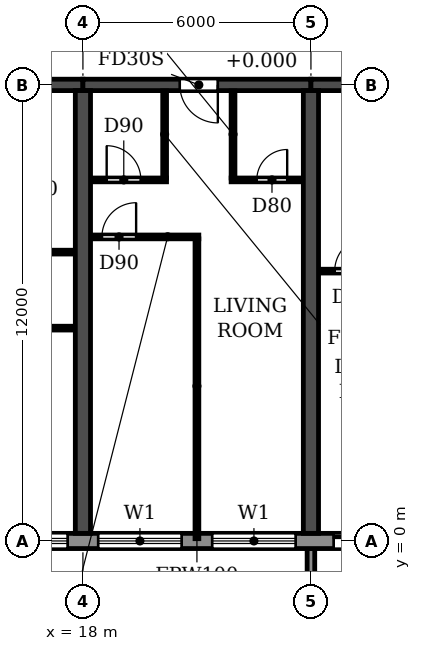
"""IFC4 building model, lengths in metres.
Left out: names, types, materials, properties, quantities, classifications, styles, units other than length and angle.
Written with IfcOpenShell. Run it as: python <this file> out.ifc"""

import sys

from ifc_helpers import new_model, si_unit, direction, frame, frame_2d, origin, place, context, subcontext, project, spatial, polyline, rectangle, outline, extrude, source, transform, mapped, element, fill, save


model = new_model("IFC4")
c1 = context("Model", 3, precision=1e-05, world=origin(), true_north=direction((0.0, 1.0)))
c2 = subcontext(c1, "Body", "Model", "MODEL_VIEW")
j1 = project(units=[si_unit("LENGTHUNIT", "METRE"), si_unit("PLANEANGLEUNIT", "RADIAN")], contexts=[c1])
p1 = place(None, origin())
s1 = spatial("IfcSite", under=j1, at=p1, CompositionType="ELEMENT")
p2 = place(p1, origin())
s2 = spatial("IfcBuilding", under=s1, at=p2, CompositionType="ELEMENT")
p3 = place(p2, frame((0.0, 0.0, 23.4)))
s3 = spatial("IfcBuildingStorey", under=s2, at=p3, CompositionType="ELEMENT", Elevation=23.4)
for number, where, z_axis, x_axis in (
    (1, (18.0, 0.2, 0.0), (0.0, 0.0, 1.0), (0.0, 1.0, 0.0)),
    (2, (24.0, 0.2, 0.0), (0.0, 0.0, 1.0), (0.0, 1.0, 0.0)),
):
    element("IfcWall", number, at=place(p3, frame(where, z_axis=z_axis, x_axis=x_axis)), inside=s3, PredefinedType="SHEAR", context=c2, shape_type="SweptSolid", body=[
        extrude(rectangle(XDim=11.65, YDim=0.4, at=frame_2d((5.825, 0.0))), origin(), (0.0, 0.0, 1.0), 3.05),
    ])
p4 = place(p3, frame((12.0, 12.0, 0.0), z_axis=(0.0, 0.0, 1.0), x_axis=(1.0, 0.0, 0.0)))
e3 = element("IfcWall", 3, at=p4, inside=s3, PredefinedType="SHEAR", context=c2, shape_type="SweptSolid", body=[
    extrude(rectangle(XDim=6.0, YDim=0.3, at=frame_2d((3.0, 0.0))), origin(), (0.0, 0.0, 1.0), 2.45),
])
p5 = place(p3, frame((18.0, 12.0, 0.0), z_axis=(0.0, 0.0, 1.0), x_axis=(1.0, 0.0, 0.0)))
e4 = element("IfcWall", 4, at=p5, inside=s3, PredefinedType="SHEAR", context=c2, shape_type="SweptSolid", body=[
    extrude(rectangle(XDim=6.0, YDim=0.3, at=frame_2d((3.0, 0.0))), origin(), (0.0, 0.0, 1.0), 2.45),
])
p6 = place(p5, frame((2.55, 0.0, 0.0)))
e5 = element("IfcOpeningElement", 5, at=p6, cuts=e4, PredefinedType="OPENING", context=c2, shape_type="SweptSolid", body=[
    extrude(rectangle(XDim=1.0, YDim=2.1, at=frame_2d((0.5, 1.05))), frame((0.0, 0.16, 0.0), z_axis=(0.0, -1.0, 0.0), x_axis=(1.0, 0.0, 0.0)), (0.0, 0.0, 1.0), 0.32),
])
p7 = place(p3, frame((24.0, 12.0, 0.0), z_axis=(0.0, 0.0, 1.0), x_axis=(1.0, 0.0, 0.0)))
e6 = element("IfcWall", 6, at=p7, inside=s3, PredefinedType="SHEAR", context=c2, shape_type="SweptSolid", body=[
    extrude(rectangle(XDim=6.0, YDim=0.3, at=frame_2d((3.0, 0.0))), origin(), (0.0, 0.0, 1.0), 2.45),
])
p8 = place(p7, frame((2.55, 0.0, 0.0)))
e7 = element("IfcOpeningElement", 7, at=p8, cuts=e6, PredefinedType="OPENING", context=c2, shape_type="SweptSolid", body=[
    extrude(rectangle(XDim=1.0, YDim=2.1, at=frame_2d((0.5, 1.05))), frame((0.0, 0.16, 0.0), z_axis=(0.0, -1.0, 0.0), x_axis=(1.0, 0.0, 0.0)), (0.0, 0.0, 1.0), 0.32),
])
p9 = place(p3, frame((4.683, 0.0, 0.0), z_axis=(0.0, 0.0, 1.0), x_axis=(1.0, 0.0, 0.0)))
e8 = element("IfcWall", 8, at=p9, inside=s3, PredefinedType="STANDARD", context=c2, shape_type="SweptSolid", body=[
    extrude(rectangle(XDim=92.634, YDim=0.4, at=frame_2d((46.317, 0.0))), origin(), (0.0, 0.0, 1.0), 3.05),
])
p10 = place(p9, frame((1.717, 0.0, 0.9)))
e9 = element("IfcOpeningElement", 9, at=p10, cuts=e8, PredefinedType="OPENING", context=c2, shape_type="SweptSolid", body=[
    extrude(rectangle(XDim=2.2, YDim=1.5, at=frame_2d((1.1, 0.75))), frame((0.0, 0.21, 0.0), z_axis=(0.0, -1.0, 0.0), x_axis=(1.0, 0.0, 0.0)), (0.0, 0.0, 1.0), 0.42),
])
p11 = place(p9, frame((4.717, 0.0, 0.9)))
e10 = element("IfcOpeningElement", 10, at=p11, cuts=e8, PredefinedType="OPENING", context=c2, shape_type="SweptSolid", body=[
    extrude(rectangle(XDim=2.2, YDim=1.5, at=frame_2d((1.1, 0.75))), frame((0.0, 0.21, 0.0), z_axis=(0.0, -1.0, 0.0), x_axis=(1.0, 0.0, 0.0)), (0.0, 0.0, 1.0), 0.42),
])
p12 = place(p9, frame((7.717, 0.0, 0.9)))
e11 = element("IfcOpeningElement", 11, at=p12, cuts=e8, PredefinedType="OPENING", context=c2, shape_type="SweptSolid", body=[
    extrude(rectangle(XDim=2.2, YDim=1.5, at=frame_2d((1.1, 0.75))), frame((0.0, 0.21, 0.0), z_axis=(0.0, -1.0, 0.0), x_axis=(1.0, 0.0, 0.0)), (0.0, 0.0, 1.0), 0.42),
])
p13 = place(p9, frame((10.717, 0.0, 0.9)))
e12 = element("IfcOpeningElement", 12, at=p13, cuts=e8, PredefinedType="OPENING", context=c2, shape_type="SweptSolid", body=[
    extrude(rectangle(XDim=2.2, YDim=1.5, at=frame_2d((1.1, 0.75))), frame((0.0, 0.21, 0.0), z_axis=(0.0, -1.0, 0.0), x_axis=(1.0, 0.0, 0.0)), (0.0, 0.0, 1.0), 0.42),
])
p14 = place(p9, frame((13.717, 0.0, 0.9)))
e13 = element("IfcOpeningElement", 13, at=p14, cuts=e8, PredefinedType="OPENING", context=c2, shape_type="SweptSolid", body=[
    extrude(rectangle(XDim=2.2, YDim=1.5, at=frame_2d((1.1, 0.75))), frame((0.0, 0.21, 0.0), z_axis=(0.0, -1.0, 0.0), x_axis=(1.0, 0.0, 0.0)), (0.0, 0.0, 1.0), 0.42),
])
p15 = place(p9, frame((16.717, 0.0, 0.9)))
e14 = element("IfcOpeningElement", 14, at=p15, cuts=e8, PredefinedType="OPENING", context=c2, shape_type="SweptSolid", body=[
    extrude(rectangle(XDim=2.2, YDim=1.5, at=frame_2d((1.1, 0.75))), frame((0.0, 0.21, 0.0), z_axis=(0.0, -1.0, 0.0), x_axis=(1.0, 0.0, 0.0)), (0.0, 0.0, 1.0), 0.42),
])
p16 = place(p9, frame((19.917, 0.0, 0.0)))
e15 = element("IfcOpeningElement", 15, at=p16, cuts=e8, PredefinedType="OPENING", context=c2, shape_type="SweptSolid", body=[
    extrude(rectangle(XDim=1.8, YDim=2.4, at=frame_2d((0.9, 1.2))), frame((0.0, 0.21, 0.0), z_axis=(0.0, -1.0, 0.0), x_axis=(1.0, 0.0, 0.0)), (0.0, 0.0, 1.0), 0.42),
])
p17 = place(p9, frame((22.717, 0.0, 0.9)))
e16 = element("IfcOpeningElement", 16, at=p17, cuts=e8, PredefinedType="OPENING", context=c2, shape_type="SweptSolid", body=[
    extrude(rectangle(XDim=2.2, YDim=1.5, at=frame_2d((1.1, 0.75))), frame((0.0, 0.21, 0.0), z_axis=(0.0, -1.0, 0.0), x_axis=(1.0, 0.0, 0.0)), (0.0, 0.0, 1.0), 0.42),
])
p18 = place(p9, frame((25.717, 0.0, 0.9)))
e17 = element("IfcOpeningElement", 17, at=p18, cuts=e8, PredefinedType="OPENING", context=c2, shape_type="SweptSolid", body=[
    extrude(rectangle(XDim=2.2, YDim=1.5, at=frame_2d((1.1, 0.75))), frame((0.0, 0.21, 0.0), z_axis=(0.0, -1.0, 0.0), x_axis=(1.0, 0.0, 0.0)), (0.0, 0.0, 1.0), 0.42),
])
p19 = place(p9, frame((28.717, 0.0, 0.9)))
e18 = element("IfcOpeningElement", 18, at=p19, cuts=e8, PredefinedType="OPENING", context=c2, shape_type="SweptSolid", body=[
    extrude(rectangle(XDim=2.2, YDim=1.5, at=frame_2d((1.1, 0.75))), frame((0.0, 0.21, 0.0), z_axis=(0.0, -1.0, 0.0), x_axis=(1.0, 0.0, 0.0)), (0.0, 0.0, 1.0), 0.42),
])
p20 = place(p9, frame((31.917, 0.0, 0.0)))
e19 = element("IfcOpeningElement", 19, at=p20, cuts=e8, PredefinedType="OPENING", context=c2, shape_type="SweptSolid", body=[
    extrude(rectangle(XDim=1.8, YDim=2.4, at=frame_2d((0.9, 1.2))), frame((0.0, 0.21, 0.0), z_axis=(0.0, -1.0, 0.0), x_axis=(1.0, 0.0, 0.0)), (0.0, 0.0, 1.0), 0.42),
])
p21 = place(p9, frame((34.717, 0.0, 0.9)))
e20 = element("IfcOpeningElement", 20, at=p21, cuts=e8, PredefinedType="OPENING", context=c2, shape_type="SweptSolid", body=[
    extrude(rectangle(XDim=2.2, YDim=1.5, at=frame_2d((1.1, 0.75))), frame((0.0, 0.21, 0.0), z_axis=(0.0, -1.0, 0.0), x_axis=(1.0, 0.0, 0.0)), (0.0, 0.0, 1.0), 0.42),
])
p22 = place(p9, frame((37.717, 0.0, 0.9)))
e21 = element("IfcOpeningElement", 21, at=p22, cuts=e8, PredefinedType="OPENING", context=c2, shape_type="SweptSolid", body=[
    extrude(rectangle(XDim=2.2, YDim=1.5, at=frame_2d((1.1, 0.75))), frame((0.0, 0.21, 0.0), z_axis=(0.0, -1.0, 0.0), x_axis=(1.0, 0.0, 0.0)), (0.0, 0.0, 1.0), 0.42),
])
p23 = place(p9, frame((40.717, 0.0, 0.9)))
e22 = element("IfcOpeningElement", 22, at=p23, cuts=e8, PredefinedType="OPENING", context=c2, shape_type="SweptSolid", body=[
    extrude(rectangle(XDim=2.2, YDim=1.5, at=frame_2d((1.1, 0.75))), frame((0.0, 0.21, 0.0), z_axis=(0.0, -1.0, 0.0), x_axis=(1.0, 0.0, 0.0)), (0.0, 0.0, 1.0), 0.42),
])
p24 = place(p9, frame((43.917, 0.0, 0.0)))
e23 = element("IfcOpeningElement", 23, at=p24, cuts=e8, PredefinedType="OPENING", context=c2, shape_type="SweptSolid", body=[
    extrude(rectangle(XDim=1.8, YDim=2.4, at=frame_2d((0.9, 1.2))), frame((0.0, 0.21, 0.0), z_axis=(0.0, -1.0, 0.0), x_axis=(1.0, 0.0, 0.0)), (0.0, 0.0, 1.0), 0.42),
])
p25 = place(p9, frame((46.717, 0.0, 0.9)))
e24 = element("IfcOpeningElement", 24, at=p25, cuts=e8, PredefinedType="OPENING", context=c2, shape_type="SweptSolid", body=[
    extrude(rectangle(XDim=2.2, YDim=1.5, at=frame_2d((1.1, 0.75))), frame((0.0, 0.21, 0.0), z_axis=(0.0, -1.0, 0.0), x_axis=(1.0, 0.0, 0.0)), (0.0, 0.0, 1.0), 0.42),
])
p26 = place(p9, frame((49.717, 0.0, 0.9)))
e25 = element("IfcOpeningElement", 25, at=p26, cuts=e8, PredefinedType="OPENING", context=c2, shape_type="SweptSolid", body=[
    extrude(rectangle(XDim=2.2, YDim=1.5, at=frame_2d((1.1, 0.75))), frame((0.0, 0.21, 0.0), z_axis=(0.0, -1.0, 0.0), x_axis=(1.0, 0.0, 0.0)), (0.0, 0.0, 1.0), 0.42),
])
p27 = place(p9, frame((52.717, 0.0, 0.9)))
e26 = element("IfcOpeningElement", 26, at=p27, cuts=e8, PredefinedType="OPENING", context=c2, shape_type="SweptSolid", body=[
    extrude(rectangle(XDim=2.2, YDim=1.5, at=frame_2d((1.1, 0.75))), frame((0.0, 0.21, 0.0), z_axis=(0.0, -1.0, 0.0), x_axis=(1.0, 0.0, 0.0)), (0.0, 0.0, 1.0), 0.42),
])
p28 = place(p9, frame((55.717, 0.0, 0.9)))
e27 = element("IfcOpeningElement", 27, at=p28, cuts=e8, PredefinedType="OPENING", context=c2, shape_type="SweptSolid", body=[
    extrude(rectangle(XDim=2.2, YDim=1.5, at=frame_2d((1.1, 0.75))), frame((0.0, 0.21, 0.0), z_axis=(0.0, -1.0, 0.0), x_axis=(1.0, 0.0, 0.0)), (0.0, 0.0, 1.0), 0.42),
])
p29 = place(p9, frame((58.917, 0.0, 0.0)))
e28 = element("IfcOpeningElement", 28, at=p29, cuts=e8, PredefinedType="OPENING", context=c2, shape_type="SweptSolid", body=[
    extrude(rectangle(XDim=1.8, YDim=2.4, at=frame_2d((0.9, 1.2))), frame((0.0, 0.21, 0.0), z_axis=(0.0, -1.0, 0.0), x_axis=(1.0, 0.0, 0.0)), (0.0, 0.0, 1.0), 0.42),
])
p30 = place(p9, frame((61.717, 0.0, 0.9)))
e29 = element("IfcOpeningElement", 29, at=p30, cuts=e8, PredefinedType="OPENING", context=c2, shape_type="SweptSolid", body=[
    extrude(rectangle(XDim=2.2, YDim=1.5, at=frame_2d((1.1, 0.75))), frame((0.0, 0.21, 0.0), z_axis=(0.0, -1.0, 0.0), x_axis=(1.0, 0.0, 0.0)), (0.0, 0.0, 1.0), 0.42),
])
p31 = place(p9, frame((64.717, 0.0, 0.9)))
e30 = element("IfcOpeningElement", 30, at=p31, cuts=e8, PredefinedType="OPENING", context=c2, shape_type="SweptSolid", body=[
    extrude(rectangle(XDim=2.2, YDim=1.5, at=frame_2d((1.1, 0.75))), frame((0.0, 0.21, 0.0), z_axis=(0.0, -1.0, 0.0), x_axis=(1.0, 0.0, 0.0)), (0.0, 0.0, 1.0), 0.42),
])
p32 = place(p9, frame((67.717, 0.0, 0.9)))
e31 = element("IfcOpeningElement", 31, at=p32, cuts=e8, PredefinedType="OPENING", context=c2, shape_type="SweptSolid", body=[
    extrude(rectangle(XDim=2.2, YDim=1.5, at=frame_2d((1.1, 0.75))), frame((0.0, 0.21, 0.0), z_axis=(0.0, -1.0, 0.0), x_axis=(1.0, 0.0, 0.0)), (0.0, 0.0, 1.0), 0.42),
])
p33 = place(p9, frame((70.917, 0.0, 0.0)))
e32 = element("IfcOpeningElement", 32, at=p33, cuts=e8, PredefinedType="OPENING", context=c2, shape_type="SweptSolid", body=[
    extrude(rectangle(XDim=1.8, YDim=2.4, at=frame_2d((0.9, 1.2))), frame((0.0, 0.21, 0.0), z_axis=(0.0, -1.0, 0.0), x_axis=(1.0, 0.0, 0.0)), (0.0, 0.0, 1.0), 0.42),
])
p34 = place(p9, frame((73.717, 0.0, 0.9)))
e33 = element("IfcOpeningElement", 33, at=p34, cuts=e8, PredefinedType="OPENING", context=c2, shape_type="SweptSolid", body=[
    extrude(rectangle(XDim=2.2, YDim=1.5, at=frame_2d((1.1, 0.75))), frame((0.0, 0.21, 0.0), z_axis=(0.0, -1.0, 0.0), x_axis=(1.0, 0.0, 0.0)), (0.0, 0.0, 1.0), 0.42),
])
p35 = place(p9, frame((76.717, 0.0, 0.9)))
e34 = element("IfcOpeningElement", 34, at=p35, cuts=e8, PredefinedType="OPENING", context=c2, shape_type="SweptSolid", body=[
    extrude(rectangle(XDim=2.2, YDim=1.5, at=frame_2d((1.1, 0.75))), frame((0.0, 0.21, 0.0), z_axis=(0.0, -1.0, 0.0), x_axis=(1.0, 0.0, 0.0)), (0.0, 0.0, 1.0), 0.42),
])
p36 = place(p9, frame((79.717, 0.0, 0.9)))
e35 = element("IfcOpeningElement", 35, at=p36, cuts=e8, PredefinedType="OPENING", context=c2, shape_type="SweptSolid", body=[
    extrude(rectangle(XDim=2.2, YDim=1.5, at=frame_2d((1.1, 0.75))), frame((0.0, 0.21, 0.0), z_axis=(0.0, -1.0, 0.0), x_axis=(1.0, 0.0, 0.0)), (0.0, 0.0, 1.0), 0.42),
])
p37 = place(p9, frame((82.717, 0.0, 0.9)))
e36 = element("IfcOpeningElement", 36, at=p37, cuts=e8, PredefinedType="OPENING", context=c2, shape_type="SweptSolid", body=[
    extrude(rectangle(XDim=2.2, YDim=1.5, at=frame_2d((1.1, 0.75))), frame((0.0, 0.21, 0.0), z_axis=(0.0, -1.0, 0.0), x_axis=(1.0, 0.0, 0.0)), (0.0, 0.0, 1.0), 0.42),
])
p38 = place(p9, frame((85.717, 0.0, 0.9)))
e37 = element("IfcOpeningElement", 37, at=p38, cuts=e8, PredefinedType="OPENING", context=c2, shape_type="SweptSolid", body=[
    extrude(rectangle(XDim=2.2, YDim=1.5, at=frame_2d((1.1, 0.75))), frame((0.0, 0.21, 0.0), z_axis=(0.0, -1.0, 0.0), x_axis=(1.0, 0.0, 0.0)), (0.0, 0.0, 1.0), 0.42),
])
p39 = place(p9, frame((88.717, 0.0, 0.9)))
e38 = element("IfcOpeningElement", 38, at=p39, cuts=e8, PredefinedType="OPENING", context=c2, shape_type="SweptSolid", body=[
    extrude(rectangle(XDim=2.2, YDim=1.5, at=frame_2d((1.1, 0.75))), frame((0.0, 0.21, 0.0), z_axis=(0.0, -1.0, 0.0), x_axis=(1.0, 0.0, 0.0)), (0.0, 0.0, 1.0), 0.42),
])
m1 = source(origin(), c2, "Body", "SweptSolid", [
    extrude(outline(polyline([(0.0, 0.0), (0.2, 0.0), (0.2, 1.65), (0.0, 1.65), (0.0, 0.0)])), origin(), (0.0, 0.0, 1.0), 3.1),
])
p40 = place(p3, frame((23.9, -1.85, 0.0)))
e39 = element("IfcWall", 39, at=p40, inside=s3, PredefinedType="STANDARD", context=c2, shape_type="MappedRepresentation", body=[
    mapped(m1, transform((0.0, 0.0, 0.0))),
])
p41 = place(p3, frame((12.21, 5.6, 0.0), z_axis=(0.0, 0.0, 1.0), x_axis=(1.0, 0.0, 0.0)))
e40 = element("IfcWall", 40, at=p41, inside=s3, PredefinedType="PARTITIONING", context=c2, shape_type="SweptSolid", body=[
    extrude(rectangle(XDim=5.58, YDim=0.1, at=frame_2d((2.79, 0.0))), origin(), (0.0, 0.0, 1.0), 3.05),
])
p42 = place(p41, frame((1.39, 0.0, 0.0)))
e41 = element("IfcOpeningElement", 41, at=p42, cuts=e40, PredefinedType="OPENING", context=c2, shape_type="SweptSolid", body=[
    extrude(rectangle(XDim=0.9, YDim=2.1, at=frame_2d((0.45, 1.05))), frame((0.0, 0.06, 0.0), z_axis=(0.0, -1.0, 0.0), x_axis=(1.0, 0.0, 0.0)), (0.0, 0.0, 1.0), 0.12),
])
p43 = place(p41, frame((3.29, 0.0, 0.0)))
e42 = element("IfcOpeningElement", 42, at=p43, cuts=e40, PredefinedType="OPENING", context=c2, shape_type="SweptSolid", body=[
    extrude(rectangle(XDim=0.9, YDim=2.1, at=frame_2d((0.45, 1.05))), frame((0.0, 0.06, 0.0), z_axis=(0.0, -1.0, 0.0), x_axis=(1.0, 0.0, 0.0)), (0.0, 0.0, 1.0), 0.12),
])
p44 = place(p3, frame((24.21, 7.1, 0.0), z_axis=(0.0, 0.0, 1.0), x_axis=(1.0, 0.0, 0.0)))
e43 = element("IfcWall", 43, at=p44, inside=s3, PredefinedType="PARTITIONING", context=c2, shape_type="SweptSolid", body=[
    extrude(rectangle(XDim=1.99, YDim=0.1, at=frame_2d((0.995, 0.0))), origin(), (0.0, 0.0, 1.0), 3.05),
])
p45 = place(p44, frame((0.415, 0.0, 0.0)))
e44 = element("IfcOpeningElement", 44, at=p45, cuts=e43, PredefinedType="OPENING", context=c2, shape_type="SweptSolid", body=[
    extrude(rectangle(XDim=0.9, YDim=2.1, at=frame_2d((0.45, 1.05))), frame((0.0, 0.06, 0.0), z_axis=(0.0, -1.0, 0.0), x_axis=(1.0, 0.0, 0.0)), (0.0, 0.0, 1.0), 0.12),
])
p46 = place(p3, frame((14.65, 7.6, 0.0), z_axis=(0.0, 0.0, 1.0), x_axis=(1.0, 0.0, 0.0)))
e45 = element("IfcWall", 45, at=p46, inside=s3, PredefinedType="PARTITIONING", context=c2, shape_type="SweptSolid", body=[
    extrude(rectangle(XDim=3.14, YDim=0.1, at=frame_2d((1.57, 0.0))), origin(), (0.0, 0.0, 1.0), 3.05),
])
p47 = place(p46, frame((1.3, 0.0, 0.0)))
e46 = element("IfcOpeningElement", 46, at=p47, cuts=e45, PredefinedType="OPENING", context=c2, shape_type="SweptSolid", body=[
    extrude(rectangle(XDim=0.8, YDim=2.1, at=frame_2d((0.4, 1.05))), frame((0.0, 0.06, 0.0), z_axis=(0.0, -1.0, 0.0), x_axis=(1.0, 0.0, 0.0)), (0.0, 0.0, 1.0), 0.12),
])
p48 = place(p3, frame((18.21, 8.0, 0.0), z_axis=(0.0, 0.0, 1.0), x_axis=(1.0, 0.0, 0.0)))
e47 = element("IfcWall", 47, at=p48, inside=s3, PredefinedType="PARTITIONING", context=c2, shape_type="SweptSolid", body=[
    extrude(rectangle(XDim=2.84, YDim=0.1, at=frame_2d((1.42, 0.0))), origin(), (0.0, 0.0, 1.0), 3.05),
])
p49 = place(p48, frame((0.29, 0.0, 0.0)))
e48 = element("IfcOpeningElement", 48, at=p49, cuts=e47, PredefinedType="OPENING", context=c2, shape_type="SweptSolid", body=[
    extrude(rectangle(XDim=0.9, YDim=2.1, at=frame_2d((0.45, 1.05))), frame((0.0, 0.06, 0.0), z_axis=(0.0, -1.0, 0.0), x_axis=(1.0, 0.0, 0.0)), (0.0, 0.0, 1.0), 0.12),
])
p50 = place(p3, frame((18.21, 9.5, 0.0), z_axis=(0.0, 0.0, 1.0), x_axis=(1.0, 0.0, 0.0)))
e49 = element("IfcWall", 49, at=p50, inside=s3, PredefinedType="PARTITIONING", context=c2, shape_type="SweptSolid", body=[
    extrude(rectangle(XDim=1.99, YDim=0.1, at=frame_2d((0.995, 0.0))), origin(), (0.0, 0.0, 1.0), 3.05),
])
p51 = place(p50, frame((0.415, 0.0, 0.0)))
e50 = element("IfcOpeningElement", 50, at=p51, cuts=e49, PredefinedType="OPENING", context=c2, shape_type="SweptSolid", body=[
    extrude(rectangle(XDim=0.9, YDim=2.1, at=frame_2d((0.45, 1.05))), frame((0.0, 0.06, 0.0), z_axis=(0.0, -1.0, 0.0), x_axis=(1.0, 0.0, 0.0)), (0.0, 0.0, 1.0), 0.12),
])
p52 = place(p3, frame((21.9, 9.5, 0.0), z_axis=(0.0, 0.0, 1.0), x_axis=(1.0, 0.0, 0.0)))
e51 = element("IfcWall", 51, at=p52, inside=s3, PredefinedType="PARTITIONING", context=c2, shape_type="SweptSolid", body=[
    extrude(rectangle(XDim=1.89, YDim=0.1, at=frame_2d((0.945, 0.0))), origin(), (0.0, 0.0, 1.0), 3.05),
])
p53 = place(p52, frame((0.675, 0.0, 0.0)))
e52 = element("IfcOpeningElement", 52, at=p53, cuts=e51, PredefinedType="OPENING", context=c2, shape_type="SweptSolid", body=[
    extrude(rectangle(XDim=0.8, YDim=2.1, at=frame_2d((0.4, 1.05))), frame((0.0, 0.06, 0.0), z_axis=(0.0, -1.0, 0.0), x_axis=(1.0, 0.0, 0.0)), (0.0, 0.0, 1.0), 0.12),
])
p54 = place(p3, frame((20.15, 9.55, 0.0), z_axis=(0.0, 0.0, 1.0), x_axis=(0.0, 1.0, 0.0)))
e53 = element("IfcWall", 53, at=p54, inside=s3, PredefinedType="PARTITIONING", context=c2, shape_type="SweptSolid", body=[
    extrude(rectangle(XDim=2.29, YDim=0.1, at=frame_2d((1.145, 0.0))), origin(), (0.0, 0.0, 1.0), 3.05),
])
p55 = place(p3, frame((21.0, 0.06, 0.0), z_axis=(0.0, 0.0, 1.0), x_axis=(0.0, 1.0, 0.0)))
e54 = element("IfcWall", 54, at=p55, inside=s3, PredefinedType="PARTITIONING", context=c2, shape_type="SweptSolid", body=[
    extrude(rectangle(XDim=7.89, YDim=0.1, at=frame_2d((3.945, 0.0))), origin(), (0.0, 0.0, 1.0), 3.05),
])
p56 = place(p3, frame((21.95, 9.55, 0.0), z_axis=(0.0, 0.0, 1.0), x_axis=(0.0, 1.0, 0.0)))
e55 = element("IfcWall", 55, at=p56, inside=s3, PredefinedType="PARTITIONING", context=c2, shape_type="SweptSolid", body=[
    extrude(rectangle(XDim=2.29, YDim=0.1, at=frame_2d((1.145, 0.0))), origin(), (0.0, 0.0, 1.0), 3.05),
])
p57 = place(p13, origin())
e56 = element("IfcWindow", 56, at=p57, inside=s3, PartitioningType="DOUBLE_PANEL_HORIZONTAL", PredefinedType="WINDOW", context=c2, shape_type="SweptSolid", body=[
    extrude(rectangle(XDim=2.2, YDim=1.5, at=frame_2d((1.1, 0.75))), frame((0.0, 0.03, 0.0), z_axis=(0.0, -1.0, 0.0), x_axis=(1.0, 0.0, 0.0)), (0.0, 0.0, 1.0), 0.06),
])
fill(e12, e56)
p58 = place(p14, origin())
e57 = element("IfcWindow", 57, at=p58, inside=s3, PartitioningType="DOUBLE_PANEL_HORIZONTAL", PredefinedType="WINDOW", context=c2, shape_type="SweptSolid", body=[
    extrude(rectangle(XDim=2.2, YDim=1.5, at=frame_2d((1.1, 0.75))), frame((0.0, 0.03, 0.0), z_axis=(0.0, -1.0, 0.0), x_axis=(1.0, 0.0, 0.0)), (0.0, 0.0, 1.0), 0.06),
])
fill(e13, e57)
p59 = place(p15, origin())
e58 = element("IfcWindow", 58, at=p59, inside=s3, PartitioningType="DOUBLE_PANEL_HORIZONTAL", PredefinedType="WINDOW", context=c2, shape_type="SweptSolid", body=[
    extrude(rectangle(XDim=2.2, YDim=1.5, at=frame_2d((1.1, 0.75))), frame((0.0, 0.03, 0.0), z_axis=(0.0, -1.0, 0.0), x_axis=(1.0, 0.0, 0.0)), (0.0, 0.0, 1.0), 0.06),
])
fill(e14, e58)
p60 = place(p16, origin())
e59 = element("IfcDoor", 59, at=p60, inside=s3, OperationType="DOUBLE_DOOR_SLIDING", PredefinedType="DOOR", context=c2, shape_type="SweptSolid", body=[
    extrude(rectangle(XDim=1.8, YDim=2.4, at=frame_2d((0.9, 1.2))), frame((0.0, 0.025, 0.0), z_axis=(0.0, -1.0, 0.0), x_axis=(1.0, 0.0, 0.0)), (0.0, 0.0, 1.0), 0.05),
])
fill(e15, e59)
p61 = place(p49, origin())
e60 = element("IfcDoor", 60, at=p61, inside=s3, OperationType="SINGLE_SWING_RIGHT", PredefinedType="DOOR", context=c2, shape_type="SweptSolid", body=[
    extrude(rectangle(XDim=0.9, YDim=2.1, at=frame_2d((0.45, 1.05))), frame((0.0, 0.025, 0.0), z_axis=(0.0, -1.0, 0.0), x_axis=(1.0, 0.0, 0.0)), (0.0, 0.0, 1.0), 0.05),
])
fill(e48, e60)
p62 = place(p51, origin())
e61 = element("IfcDoor", 61, at=p62, inside=s3, OperationType="SINGLE_SWING_LEFT", PredefinedType="DOOR", context=c2, shape_type="SweptSolid", body=[
    extrude(rectangle(XDim=0.9, YDim=2.1, at=frame_2d((0.45, 1.05))), frame((0.0, 0.025, 0.0), z_axis=(0.0, -1.0, 0.0), x_axis=(1.0, 0.0, 0.0)), (0.0, 0.0, 1.0), 0.05),
])
fill(e50, e61)
p63 = place(p6, frame((1.0, 0.0, 0.0), z_axis=(0.0, 0.0, 1.0), x_axis=(-1.0, 0.0, 0.0)))
e62 = element("IfcDoor", 62, at=p63, inside=s3, OperationType="SINGLE_SWING_LEFT", PredefinedType="DOOR", context=c2, shape_type="SweptSolid", body=[
    extrude(rectangle(XDim=1.0, YDim=2.1, at=frame_2d((0.5, 1.05))), frame((0.0, 0.025, 0.0), z_axis=(0.0, -1.0, 0.0), x_axis=(1.0, 0.0, 0.0)), (0.0, 0.0, 1.0), 0.05),
])
fill(e5, e62)
p64 = place(p53, origin())
e63 = element("IfcDoor", 63, at=p64, inside=s3, OperationType="SINGLE_SWING_RIGHT", PredefinedType="DOOR", context=c2, shape_type="SweptSolid", body=[
    extrude(rectangle(XDim=0.8, YDim=2.1, at=frame_2d((0.4, 1.05))), frame((0.0, 0.025, 0.0), z_axis=(0.0, -1.0, 0.0), x_axis=(1.0, 0.0, 0.0)), (0.0, 0.0, 1.0), 0.05),
])
fill(e52, e63)
p65 = place(p45, origin())
e64 = element("IfcDoor", 64, at=p65, inside=s3, OperationType="SINGLE_SWING_RIGHT", PredefinedType="DOOR", context=c2, shape_type="SweptSolid", body=[
    extrude(rectangle(XDim=0.9, YDim=2.1, at=frame_2d((0.45, 1.05))), frame((0.0, 0.025, 0.0), z_axis=(0.0, -1.0, 0.0), x_axis=(1.0, 0.0, 0.0)), (0.0, 0.0, 1.0), 0.05),
])
fill(e44, e64)
save(model, sys.argv[1])
